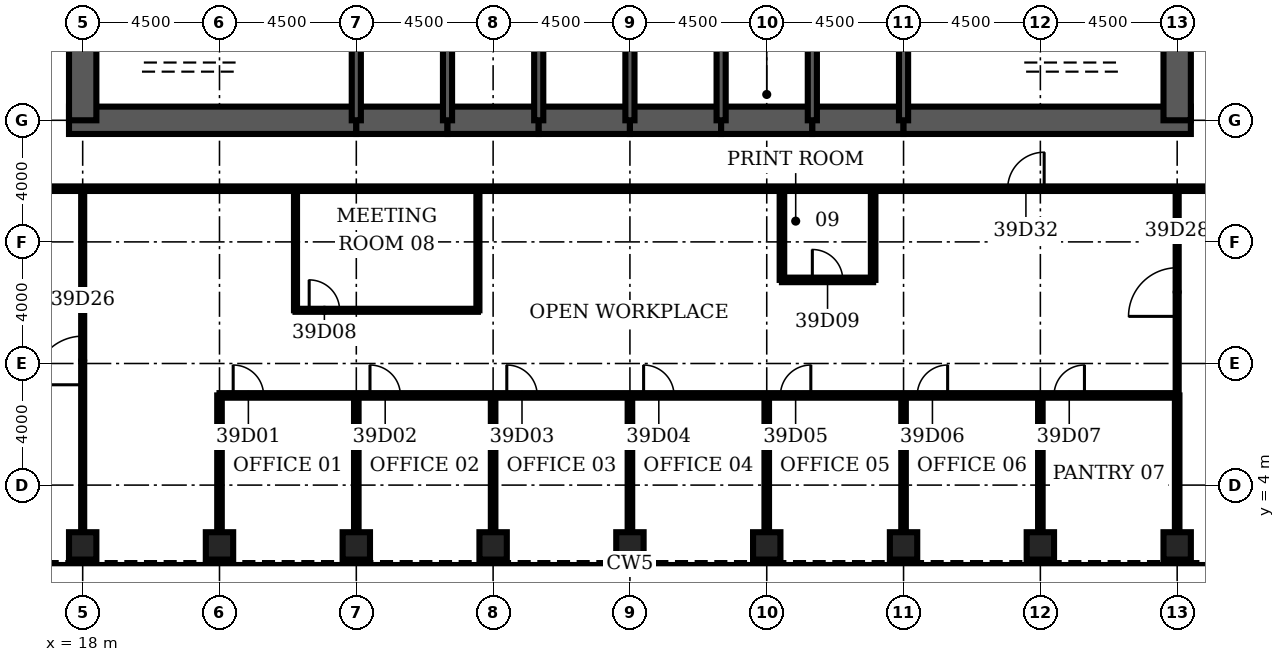
"""IFC4 building model, lengths in metres.
Left out: names, types, materials, properties, quantities, classifications, styles, units other than length and angle.
Written with IfcOpenShell. Run it as: python <this file> out.ifc"""

import sys

from ifc_helpers import new_model, si_unit, direction, frame, frame_2d, origin, origin_2d, place, context, subcontext, project, spatial, rectangle, hollow_rectangle, extrude, element, fill, save


model = new_model("IFC4")
c1 = context("Model", 3, precision=1e-05, world=origin(), true_north=direction((0.0, 1.0)))
c2 = subcontext(c1, "Body", "Model", "MODEL_VIEW")
j1 = project(units=[si_unit("LENGTHUNIT", "METRE"), si_unit("PLANEANGLEUNIT", "RADIAN")], contexts=[c1])
p1 = place(None, origin())
s1 = spatial("IfcSite", under=j1, at=p1, CompositionType="ELEMENT")
p2 = place(p1, origin())
s2 = spatial("IfcBuilding", under=s1, at=p2, CompositionType="ELEMENT")
p3 = place(p2, frame((0.0, 0.0, 176.1)))
s3 = spatial("IfcBuildingStorey", under=s2, at=p3, CompositionType="ELEMENT", Elevation=176.1)
for number, where, z_axis, x_axis in (
    (1, (18.0, 2.0, 0.0), (0.0, 0.0, 1.0), (0.0, 1.0, 0.0)),
    (2, (22.5, 2.0, 0.0), (0.0, 0.0, 1.0), (0.0, 1.0, 0.0)),
    (3, (27.0, 2.0, 0.0), (0.0, 0.0, 1.0), (0.0, 1.0, 0.0)),
    (4, (31.5, 2.0, 0.0), (0.0, 0.0, 1.0), (0.0, 1.0, 0.0)),
    (5, (36.0, 2.0, 0.0), (0.0, 0.0, 1.0), (0.0, 1.0, 0.0)),
    (6, (40.5, 2.0, 0.0), (0.0, 0.0, 1.0), (0.0, 1.0, 0.0)),
    (7, (45.0, 2.0, 0.0), (0.0, 0.0, 1.0), (0.0, 1.0, 0.0)),
    (8, (49.5, 2.0, 0.0), (0.0, 0.0, 1.0), (0.0, 1.0, 0.0)),
    (9, (54.0, 2.0, 0.0), (0.0, 0.0, 1.0), (0.0, 1.0, 0.0)),
):
    element("IfcColumn", number, at=place(p3, frame(where, z_axis=z_axis, x_axis=x_axis)), inside=s3, PredefinedType="COLUMN", context=c2, shape_type="SweptSolid", body=[
        extrude(hollow_rectangle(XDim=0.9, YDim=0.9, WallThickness=0.09, at=origin_2d()), origin(), (0.0, 0.0, 1.0), 4.2),
    ])
p4 = place(p3, frame((17.55, 16.0, 0.0), z_axis=(0.0, 0.0, 1.0), x_axis=(1.0, 0.0, 0.0)))
e10 = element("IfcWall", 10, at=p4, inside=s3, PredefinedType="SHEAR", context=c2, shape_type="SweptSolid", body=[
    extrude(rectangle(XDim=9.45, YDim=0.9, at=frame_2d((4.725, 0.0))), origin(), (0.0, 0.0, 1.0), 4.2),
])
for number, where, z_axis, x_axis in (
    (11, (27.0, 16.0, 0.0), (0.0, 0.0, 1.0), (1.0, 0.0, 0.0)),
    (12, (30.0, 16.0, 0.0), (0.0, 0.0, 1.0), (1.0, 0.0, 0.0)),
    (13, (33.0, 16.0, 0.0), (0.0, 0.0, 1.0), (1.0, 0.0, 0.0)),
    (14, (36.0, 16.0, 0.0), (0.0, 0.0, 1.0), (1.0, 0.0, 0.0)),
    (15, (39.0, 16.0, 0.0), (0.0, 0.0, 1.0), (1.0, 0.0, 0.0)),
    (16, (42.0, 16.0, 0.0), (0.0, 0.0, 1.0), (1.0, 0.0, 0.0)),
):
    element("IfcWall", number, at=place(p3, frame(where, z_axis=z_axis, x_axis=x_axis)), inside=s3, PredefinedType="SHEAR", context=c2, shape_type="SweptSolid", body=[
        extrude(rectangle(XDim=3.0, YDim=0.9, at=frame_2d((1.5, 0.0))), origin(), (0.0, 0.0, 1.0), 4.2),
    ])
p5 = place(p3, frame((45.0, 16.0, 0.0), z_axis=(0.0, 0.0, 1.0), x_axis=(1.0, 0.0, 0.0)))
e17 = element("IfcWall", 17, at=p5, inside=s3, PredefinedType="SHEAR", context=c2, shape_type="SweptSolid", body=[
    extrude(rectangle(XDim=9.45, YDim=0.9, at=frame_2d((4.725, 0.0))), origin(), (0.0, 0.0, 1.0), 4.2),
])
for number, where, z_axis, x_axis in (
    (18, (18.0, 19.2, 0.0), (0.0, 0.0, 1.0), (0.0, -1.0, 0.0)),
    (19, (54.0, 16.0, 0.0), (0.0, 0.0, 1.0), (0.0, 1.0, 0.0)),
):
    element("IfcWall", number, at=place(p3, frame(where, z_axis=z_axis, x_axis=x_axis)), inside=s3, PredefinedType="SHEAR", context=c2, shape_type="SweptSolid", body=[
        extrude(rectangle(XDim=3.2, YDim=0.9, at=frame_2d((1.6, 0.0))), origin(), (0.0, 0.0, 1.0), 4.2),
    ])
for number, where, z_axis, x_axis in (
    (20, (27.0, 16.0, 0.0), (0.0, 0.0, 1.0), (0.0, 1.0, 0.0)),
    (21, (30.0, 16.0, 0.0), (0.0, 0.0, 1.0), (0.0, 1.0, 0.0)),
    (22, (33.0, 16.0, 0.0), (0.0, 0.0, 1.0), (0.0, 1.0, 0.0)),
    (23, (36.0, 16.0, 0.0), (0.0, 0.0, 1.0), (0.0, 1.0, 0.0)),
    (24, (39.0, 16.0, 0.0), (0.0, 0.0, 1.0), (0.0, 1.0, 0.0)),
    (25, (42.0, 16.0, 0.0), (0.0, 0.0, 1.0), (0.0, 1.0, 0.0)),
    (26, (45.0, 16.0, 0.0), (0.0, 0.0, 1.0), (0.0, 1.0, 0.0)),
):
    element("IfcWall", number, at=place(p3, frame(where, z_axis=z_axis, x_axis=x_axis)), inside=s3, PredefinedType="SOLIDWALL", context=c2, shape_type="SweptSolid", body=[
        extrude(rectangle(XDim=3.2, YDim=0.3, at=frame_2d((1.6, 0.0))), origin(), (0.0, 0.0, 1.0), 4.2),
    ])
p6 = place(p3, frame((39.15, 17.4, 0.0), z_axis=(0.0, 0.0, 1.0), x_axis=(1.0, 0.0, 0.0)))
e27 = element("IfcWall", 27, at=p6, inside=s3, PredefinedType="SOLIDWALL", context=c2, shape_type="SweptSolid", body=[
    extrude(rectangle(XDim=2.7, YDim=0.3, at=frame_2d((1.35, 0.0))), origin(), (0.0, 0.0, 1.0), 3.95),
])
p7 = place(p6, frame((0.85, 0.0, 0.0)))
e28 = element("IfcOpeningElement", 28, at=p7, cuts=e27, PredefinedType="OPENING", context=c2, shape_type="SweptSolid", body=[
    extrude(rectangle(XDim=1.0, YDim=2.1, at=frame_2d((0.5, 1.05))), frame((0.0, 0.16, 0.0), z_axis=(0.0, -1.0, 0.0), x_axis=(1.0, 0.0, 0.0)), (0.0, 0.0, 1.0), 0.32),
])
p8 = place(p3, frame((22.5, 6.95, 0.0), z_axis=(0.0, 0.0, 1.0), x_axis=(1.0, 0.0, 0.0)))
e29 = element("IfcWall", 29, at=p8, inside=s3, PredefinedType="PARTITIONING", context=c2, shape_type="SweptSolid", body=[
    extrude(rectangle(XDim=31.5, YDim=0.15, at=frame_2d((15.75, 0.0))), origin(), (0.0, 0.0, 1.0), 3.0),
])
p9 = place(p8, frame((0.45, 0.0, 0.0)))
e30 = element("IfcOpeningElement", 30, at=p9, cuts=e29, PredefinedType="OPENING", context=c2, shape_type="SweptSolid", body=[
    extrude(rectangle(XDim=1.0, YDim=2.1, at=frame_2d((0.5, 1.05))), frame((0.0, 0.085, 0.0), z_axis=(0.0, -1.0, 0.0), x_axis=(1.0, 0.0, 0.0)), (0.0, 0.0, 1.0), 0.17),
])
p10 = place(p8, frame((4.95, 0.0, 0.0)))
e31 = element("IfcOpeningElement", 31, at=p10, cuts=e29, PredefinedType="OPENING", context=c2, shape_type="SweptSolid", body=[
    extrude(rectangle(XDim=1.0, YDim=2.1, at=frame_2d((0.5, 1.05))), frame((0.0, 0.085, 0.0), z_axis=(0.0, -1.0, 0.0), x_axis=(1.0, 0.0, 0.0)), (0.0, 0.0, 1.0), 0.17),
])
p11 = place(p8, frame((9.45, 0.0, 0.0)))
e32 = element("IfcOpeningElement", 32, at=p11, cuts=e29, PredefinedType="OPENING", context=c2, shape_type="SweptSolid", body=[
    extrude(rectangle(XDim=1.0, YDim=2.1, at=frame_2d((0.5, 1.05))), frame((0.0, 0.085, 0.0), z_axis=(0.0, -1.0, 0.0), x_axis=(1.0, 0.0, 0.0)), (0.0, 0.0, 1.0), 0.17),
])
p12 = place(p8, frame((13.95, 0.0, 0.0)))
e33 = element("IfcOpeningElement", 33, at=p12, cuts=e29, PredefinedType="OPENING", context=c2, shape_type="SweptSolid", body=[
    extrude(rectangle(XDim=1.0, YDim=2.1, at=frame_2d((0.5, 1.05))), frame((0.0, 0.085, 0.0), z_axis=(0.0, -1.0, 0.0), x_axis=(1.0, 0.0, 0.0)), (0.0, 0.0, 1.0), 0.17),
])
p13 = place(p8, frame((18.45, 0.0, 0.0)))
e34 = element("IfcOpeningElement", 34, at=p13, cuts=e29, PredefinedType="OPENING", context=c2, shape_type="SweptSolid", body=[
    extrude(rectangle(XDim=1.0, YDim=2.1, at=frame_2d((0.5, 1.05))), frame((0.0, 0.085, 0.0), z_axis=(0.0, -1.0, 0.0), x_axis=(1.0, 0.0, 0.0)), (0.0, 0.0, 1.0), 0.17),
])
p14 = place(p8, frame((22.95, 0.0, 0.0)))
e35 = element("IfcOpeningElement", 35, at=p14, cuts=e29, PredefinedType="OPENING", context=c2, shape_type="SweptSolid", body=[
    extrude(rectangle(XDim=1.0, YDim=2.1, at=frame_2d((0.5, 1.05))), frame((0.0, 0.085, 0.0), z_axis=(0.0, -1.0, 0.0), x_axis=(1.0, 0.0, 0.0)), (0.0, 0.0, 1.0), 0.17),
])
p15 = place(p8, frame((27.45, 0.0, 0.0)))
e36 = element("IfcOpeningElement", 36, at=p15, cuts=e29, PredefinedType="OPENING", context=c2, shape_type="SweptSolid", body=[
    extrude(rectangle(XDim=1.0, YDim=2.1, at=frame_2d((0.5, 1.05))), frame((0.0, 0.085, 0.0), z_axis=(0.0, -1.0, 0.0), x_axis=(1.0, 0.0, 0.0)), (0.0, 0.0, 1.0), 0.17),
])
p16 = place(p3, frame((25.0, 9.75, 0.0), z_axis=(0.0, 0.0, 1.0), x_axis=(1.0, 0.0, 0.0)))
e37 = element("IfcWall", 37, at=p16, inside=s3, PredefinedType="PARTITIONING", context=c2, shape_type="SweptSolid", body=[
    extrude(rectangle(XDim=6.0, YDim=0.1, at=frame_2d((3.0, 0.0))), origin(), (0.0, 0.0, 1.0), 3.0),
])
p17 = place(p16, frame((0.45, 0.0, 0.0)))
e38 = element("IfcOpeningElement", 38, at=p17, cuts=e37, PredefinedType="OPENING", context=c2, shape_type="SweptSolid", body=[
    extrude(rectangle(XDim=1.0, YDim=2.1, at=frame_2d((0.5, 1.05))), frame((0.0, 0.06, 0.0), z_axis=(0.0, -1.0, 0.0), x_axis=(1.0, 0.0, 0.0)), (0.0, 0.0, 1.0), 0.12),
])
p18 = place(p3, frame((41.0, 10.75, 0.0), z_axis=(0.0, 0.0, 1.0), x_axis=(1.0, 0.0, 0.0)))
e39 = element("IfcWall", 39, at=p18, inside=s3, PredefinedType="PARTITIONING", context=c2, shape_type="SweptSolid", body=[
    extrude(rectangle(XDim=3.0, YDim=0.15, at=frame_2d((1.5, 0.0))), origin(), (0.0, 0.0, 1.0), 3.0),
])
p19 = place(p18, frame((1.0, 0.0, 0.0)))
e40 = element("IfcOpeningElement", 40, at=p19, cuts=e39, PredefinedType="OPENING", context=c2, shape_type="SweptSolid", body=[
    extrude(rectangle(XDim=1.0, YDim=2.1, at=frame_2d((0.5, 1.05))), frame((0.0, 0.085, 0.0), z_axis=(0.0, -1.0, 0.0), x_axis=(1.0, 0.0, 0.0)), (0.0, 0.0, 1.0), 0.17),
])
p20 = place(p3, frame((15.15, 13.75, 0.0), z_axis=(0.0, 0.0, 1.0), x_axis=(1.0, 0.0, 0.0)))
e41 = element("IfcWall", 41, at=p20, inside=s3, PredefinedType="PARTITIONING", context=c2, shape_type="SweptSolid", body=[
    extrude(rectangle(XDim=41.7, YDim=0.15, at=frame_2d((20.85, 0.0))), origin(), (0.0, 0.0, 1.0), 3.0),
])
p21 = place(p20, frame((33.275, 0.0, 0.0)))
e42 = element("IfcOpeningElement", 42, at=p21, cuts=e41, PredefinedType="OPENING", context=c2, shape_type="SweptSolid", body=[
    extrude(rectangle(XDim=1.2, YDim=2.1, at=frame_2d((0.6, 1.05))), frame((0.0, 0.085, 0.0), z_axis=(0.0, -1.0, 0.0), x_axis=(1.0, 0.0, 0.0)), (0.0, 0.0, 1.0), 0.17),
])
p22 = place(p3, frame((18.0, 2.45, 0.0), z_axis=(0.0, 0.0, 1.0), x_axis=(0.0, 1.0, 0.0)))
e43 = element("IfcWall", 43, at=p22, inside=s3, PredefinedType="PARTITIONING", context=c2, shape_type="SweptSolid", body=[
    extrude(rectangle(XDim=11.3, YDim=0.1, at=frame_2d((5.65, 0.0))), origin(), (0.0, 0.0, 1.0), 3.0),
])
p23 = place(p22, frame((4.85, 0.0, 0.0)))
e44 = element("IfcOpeningElement", 44, at=p23, cuts=e43, PredefinedType="OPENING", context=c2, shape_type="SweptSolid", body=[
    extrude(rectangle(XDim=1.6, YDim=2.1, at=frame_2d((0.8, 1.05))), frame((0.0, 0.06, 0.0), z_axis=(0.0, -1.0, 0.0), x_axis=(1.0, 0.0, 0.0)), (0.0, 0.0, 1.0), 0.12),
])
p24 = place(p3, frame((22.5, 2.45, 0.0), z_axis=(0.0, 0.0, 1.0), x_axis=(0.0, 1.0, 0.0)))
e45 = element("IfcWall", 45, at=p24, inside=s3, PredefinedType="PARTITIONING", context=c2, shape_type="SweptSolid", body=[
    extrude(rectangle(XDim=4.5, YDim=0.15, at=frame_2d((2.25, 0.0))), origin(), (0.0, 0.0, 1.0), 3.0),
])
p25 = place(p3, frame((25.0, 9.75, 0.0), z_axis=(0.0, 0.0, 1.0), x_axis=(0.0, 1.0, 0.0)))
e46 = element("IfcWall", 46, at=p25, inside=s3, PredefinedType="PARTITIONING", context=c2, shape_type="SweptSolid", body=[
    extrude(rectangle(XDim=4.0, YDim=0.1, at=frame_2d((2.0, 0.0))), origin(), (0.0, 0.0, 1.0), 3.0),
])
p26 = place(p3, frame((27.0, 2.45, 0.0), z_axis=(0.0, 0.0, 1.0), x_axis=(0.0, 1.0, 0.0)))
e47 = element("IfcWall", 47, at=p26, inside=s3, PredefinedType="PARTITIONING", context=c2, shape_type="SweptSolid", body=[
    extrude(rectangle(XDim=4.5, YDim=0.15, at=frame_2d((2.25, 0.0))), origin(), (0.0, 0.0, 1.0), 3.0),
])
p27 = place(p3, frame((31.0, 9.75, 0.0), z_axis=(0.0, 0.0, 1.0), x_axis=(0.0, 1.0, 0.0)))
e48 = element("IfcWall", 48, at=p27, inside=s3, PredefinedType="PARTITIONING", context=c2, shape_type="SweptSolid", body=[
    extrude(rectangle(XDim=4.0, YDim=0.1, at=frame_2d((2.0, 0.0))), origin(), (0.0, 0.0, 1.0), 3.0),
])
for number, where, z_axis, x_axis in (
    (49, (31.5, 2.45, 0.0), (0.0, 0.0, 1.0), (0.0, 1.0, 0.0)),
    (50, (36.0, 2.45, 0.0), (0.0, 0.0, 1.0), (0.0, 1.0, 0.0)),
    (51, (40.5, 2.45, 0.0), (0.0, 0.0, 1.0), (0.0, 1.0, 0.0)),
):
    element("IfcWall", number, at=place(p3, frame(where, z_axis=z_axis, x_axis=x_axis)), inside=s3, PredefinedType="PARTITIONING", context=c2, shape_type="SweptSolid", body=[
        extrude(rectangle(XDim=4.5, YDim=0.15, at=frame_2d((2.25, 0.0))), origin(), (0.0, 0.0, 1.0), 3.0),
    ])
p28 = place(p3, frame((41.0, 10.75, 0.0), z_axis=(0.0, 0.0, 1.0), x_axis=(0.0, 1.0, 0.0)))
e52 = element("IfcWall", 52, at=p28, inside=s3, PredefinedType="PARTITIONING", context=c2, shape_type="SweptSolid", body=[
    extrude(rectangle(XDim=3.0, YDim=0.15, at=frame_2d((1.5, 0.0))), origin(), (0.0, 0.0, 1.0), 3.0),
])
p29 = place(p3, frame((44.0, 10.75, 0.0), z_axis=(0.0, 0.0, 1.0), x_axis=(0.0, 1.0, 0.0)))
e53 = element("IfcWall", 53, at=p29, inside=s3, PredefinedType="PARTITIONING", context=c2, shape_type="SweptSolid", body=[
    extrude(rectangle(XDim=3.0, YDim=0.15, at=frame_2d((1.5, 0.0))), origin(), (0.0, 0.0, 1.0), 2.942),
])
for number, where, z_axis, x_axis in (
    (54, (45.0, 2.45, 0.0), (0.0, 0.0, 1.0), (0.0, 1.0, 0.0)),
    (55, (49.5, 2.45, 0.0), (0.0, 0.0, 1.0), (0.0, 1.0, 0.0)),
    (56, (54.0, 2.45, 0.0), (0.0, 0.0, 1.0), (0.0, 1.0, 0.0)),
):
    element("IfcWall", number, at=place(p3, frame(where, z_axis=z_axis, x_axis=x_axis)), inside=s3, PredefinedType="PARTITIONING", context=c2, shape_type="SweptSolid", body=[
        extrude(rectangle(XDim=4.5, YDim=0.15, at=frame_2d((2.25, 0.0))), origin(), (0.0, 0.0, 1.0), 3.0),
    ])
p30 = place(p3, frame((54.0, 6.95, 0.0), z_axis=(0.0, 0.0, 1.0), x_axis=(0.0, 1.0, 0.0)))
e57 = element("IfcWall", 57, at=p30, inside=s3, PredefinedType="PARTITIONING", context=c2, shape_type="SweptSolid", body=[
    extrude(rectangle(XDim=6.8, YDim=0.1, at=frame_2d((3.4, 0.0))), origin(), (0.0, 0.0, 1.0), 3.0),
])
p31 = place(p30, frame((2.6, 0.0, 0.0)))
e58 = element("IfcOpeningElement", 58, at=p31, cuts=e57, PredefinedType="OPENING", context=c2, shape_type="SweptSolid", body=[
    extrude(rectangle(XDim=1.6, YDim=2.1, at=frame_2d((0.8, 1.05))), frame((0.0, 0.06, 0.0), z_axis=(0.0, -1.0, 0.0), x_axis=(1.0, 0.0, 0.0)), (0.0, 0.0, 1.0), 0.12),
])
p32 = place(p7, origin())
e59 = element("IfcDoor", 59, at=p32, inside=s3, OperationType="SINGLE_SWING_LEFT", PredefinedType="DOOR", context=c2, shape_type="SweptSolid", body=[
    extrude(rectangle(XDim=1.0, YDim=2.1, at=frame_2d((0.5, 1.05))), frame((0.0, 0.025, 0.0), z_axis=(0.0, -1.0, 0.0), x_axis=(1.0, 0.0, 0.0)), (0.0, 0.0, 1.0), 0.05),
])
fill(e28, e59)
p33 = place(p9, origin())
e60 = element("IfcDoor", 60, at=p33, inside=s3, OperationType="SINGLE_SWING_LEFT", PredefinedType="DOOR", context=c2, shape_type="SweptSolid", body=[
    extrude(rectangle(XDim=1.0, YDim=2.1, at=frame_2d((0.5, 1.05))), frame((0.0, 0.025, 0.0), z_axis=(0.0, -1.0, 0.0), x_axis=(1.0, 0.0, 0.0)), (0.0, 0.0, 1.0), 0.05),
])
fill(e30, e60)
p34 = place(p10, origin())
e61 = element("IfcDoor", 61, at=p34, inside=s3, OperationType="SINGLE_SWING_LEFT", PredefinedType="DOOR", context=c2, shape_type="SweptSolid", body=[
    extrude(rectangle(XDim=1.0, YDim=2.1, at=frame_2d((0.5, 1.05))), frame((0.0, 0.025, 0.0), z_axis=(0.0, -1.0, 0.0), x_axis=(1.0, 0.0, 0.0)), (0.0, 0.0, 1.0), 0.05),
])
fill(e31, e61)
p35 = place(p11, origin())
e62 = element("IfcDoor", 62, at=p35, inside=s3, OperationType="SINGLE_SWING_LEFT", PredefinedType="DOOR", context=c2, shape_type="SweptSolid", body=[
    extrude(rectangle(XDim=1.0, YDim=2.1, at=frame_2d((0.5, 1.05))), frame((0.0, 0.025, 0.0), z_axis=(0.0, -1.0, 0.0), x_axis=(1.0, 0.0, 0.0)), (0.0, 0.0, 1.0), 0.05),
])
fill(e32, e62)
p36 = place(p12, origin())
e63 = element("IfcDoor", 63, at=p36, inside=s3, OperationType="SINGLE_SWING_LEFT", PredefinedType="DOOR", context=c2, shape_type="SweptSolid", body=[
    extrude(rectangle(XDim=1.0, YDim=2.1, at=frame_2d((0.5, 1.05))), frame((0.0, 0.025, 0.0), z_axis=(0.0, -1.0, 0.0), x_axis=(1.0, 0.0, 0.0)), (0.0, 0.0, 1.0), 0.05),
])
fill(e33, e63)
p37 = place(p13, origin())
e64 = element("IfcDoor", 64, at=p37, inside=s3, OperationType="SINGLE_SWING_RIGHT", PredefinedType="DOOR", context=c2, shape_type="SweptSolid", body=[
    extrude(rectangle(XDim=1.0, YDim=2.1, at=frame_2d((0.5, 1.05))), frame((0.0, 0.025, 0.0), z_axis=(0.0, -1.0, 0.0), x_axis=(1.0, 0.0, 0.0)), (0.0, 0.0, 1.0), 0.05),
])
fill(e34, e64)
p38 = place(p14, origin())
e65 = element("IfcDoor", 65, at=p38, inside=s3, OperationType="SINGLE_SWING_RIGHT", PredefinedType="DOOR", context=c2, shape_type="SweptSolid", body=[
    extrude(rectangle(XDim=1.0, YDim=2.1, at=frame_2d((0.5, 1.05))), frame((0.0, 0.025, 0.0), z_axis=(0.0, -1.0, 0.0), x_axis=(1.0, 0.0, 0.0)), (0.0, 0.0, 1.0), 0.05),
])
fill(e35, e65)
p39 = place(p15, origin())
e66 = element("IfcDoor", 66, at=p39, inside=s3, OperationType="SINGLE_SWING_RIGHT", PredefinedType="DOOR", context=c2, shape_type="SweptSolid", body=[
    extrude(rectangle(XDim=1.0, YDim=2.1, at=frame_2d((0.5, 1.05))), frame((0.0, 0.025, 0.0), z_axis=(0.0, -1.0, 0.0), x_axis=(1.0, 0.0, 0.0)), (0.0, 0.0, 1.0), 0.05),
])
fill(e36, e66)
p40 = place(p17, origin())
e67 = element("IfcDoor", 67, at=p40, inside=s3, OperationType="SINGLE_SWING_LEFT", PredefinedType="DOOR", context=c2, shape_type="SweptSolid", body=[
    extrude(rectangle(XDim=1.0, YDim=2.1, at=frame_2d((0.5, 1.05))), frame((0.0, 0.025, 0.0), z_axis=(0.0, -1.0, 0.0), x_axis=(1.0, 0.0, 0.0)), (0.0, 0.0, 1.0), 0.05),
])
fill(e38, e67)
p41 = place(p19, origin())
e68 = element("IfcDoor", 68, at=p41, inside=s3, OperationType="SINGLE_SWING_LEFT", PredefinedType="DOOR", context=c2, shape_type="SweptSolid", body=[
    extrude(rectangle(XDim=1.0, YDim=2.1, at=frame_2d((0.5, 1.05))), frame((0.0, 0.025, 0.0), z_axis=(0.0, -1.0, 0.0), x_axis=(1.0, 0.0, 0.0)), (0.0, 0.0, 1.0), 0.05),
])
fill(e40, e68)
p42 = place(p23, origin())
e69 = element("IfcDoor", 69, at=p42, inside=s3, OperationType="SINGLE_SWING_LEFT", PredefinedType="DOOR", context=c2, shape_type="SweptSolid", body=[
    extrude(rectangle(XDim=1.6, YDim=2.1, at=frame_2d((0.8, 1.05))), frame((0.0, 0.025, 0.0), z_axis=(0.0, -1.0, 0.0), x_axis=(1.0, 0.0, 0.0)), (0.0, 0.0, 1.0), 0.05),
])
fill(e44, e69)
p43 = place(p31, origin())
e70 = element("IfcDoor", 70, at=p43, inside=s3, OperationType="SINGLE_SWING_LEFT", PredefinedType="DOOR", context=c2, shape_type="SweptSolid", body=[
    extrude(rectangle(XDim=1.6, YDim=2.1, at=frame_2d((0.8, 1.05))), frame((0.0, 0.025, 0.0), z_axis=(0.0, -1.0, 0.0), x_axis=(1.0, 0.0, 0.0)), (0.0, 0.0, 1.0), 0.05),
])
fill(e58, e70)
p44 = place(p21, origin())
e71 = element("IfcDoor", 71, at=p44, inside=s3, OperationType="SINGLE_SWING_RIGHT", PredefinedType="DOOR", context=c2, shape_type="SweptSolid", body=[
    extrude(rectangle(XDim=1.2, YDim=2.1, at=frame_2d((0.6, 1.05))), frame((0.0, 0.025, 0.0), z_axis=(0.0, -1.0, 0.0), x_axis=(1.0, 0.0, 0.0)), (0.0, 0.0, 1.0), 0.05),
])
fill(e42, e71)
save(model, sys.argv[1])
